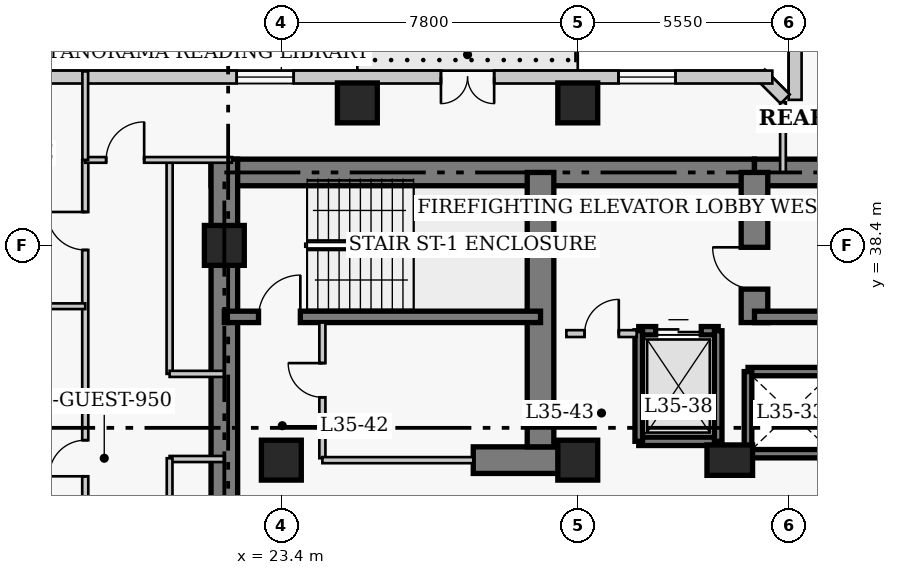
"""IFC4 building model, lengths in metres.
Left out: names, types, materials, properties, quantities, classifications, styles, units other than length and angle.
Written with IfcOpenShell. Run it as: python <this file> out.ifc"""

import sys

from ifc_helpers import new_model, si_unit, direction, frame, frame_2d, origin, origin_2d, place, context, subcontext, project, spatial, rectangle, extrude, element, fill, save


model = new_model("IFC4")
c1 = context("Model", 3, precision=1e-05, world=origin(), true_north=direction((0.0, 1.0)))
c2 = subcontext(c1, "Body", "Model", "MODEL_VIEW")
j1 = project(units=[si_unit("LENGTHUNIT", "METRE"), si_unit("PLANEANGLEUNIT", "RADIAN")], contexts=[c1])
p1 = place(None, origin())
s1 = spatial("IfcSite", under=j1, at=p1, CompositionType="ELEMENT")
p2 = place(p1, origin())
s2 = spatial("IfcBuilding", under=s1, at=p2, CompositionType="ELEMENT")
p3 = place(p2, frame((0.0, 0.0, 142.2)))
s3 = spatial("IfcBuildingStorey", under=s2, at=p3, CompositionType="ELEMENT", Elevation=142.2)
p4 = place(p3, frame((21.55, 40.32, 0.0), z_axis=(0.0, 0.0, 1.0), x_axis=(1.0, 0.0, 0.0)))
e1 = element("IfcWall", 1, at=p4, inside=s3, PredefinedType="SHEAR", context=c2, shape_type="SweptSolid", body=[
    extrude(rectangle(XDim=14.3, YDim=0.7, at=frame_2d((7.15, 0.0))), origin(), (0.0, 0.0, 1.0), 3.8),
])
p5 = place(p3, frame((35.85, 40.32, 0.0), z_axis=(0.0, 0.0, 1.0), x_axis=(1.0, 0.0, 0.0)))
e2 = element("IfcWall", 2, at=p5, inside=s3, PredefinedType="SHEAR", context=c2, shape_type="SweptSolid", body=[
    extrude(rectangle(XDim=12.6, YDim=0.7, at=frame_2d((6.3, 0.0))), origin(), (0.0, 0.0, 1.0), 3.8),
])
p6 = place(p3, frame((21.9, 27.05, 0.0), z_axis=(0.0, 0.0, 1.0), x_axis=(0.0, 1.0, 0.0)))
e3 = element("IfcWall", 3, at=p6, inside=s3, PredefinedType="SHEAR", context=c2, shape_type="SweptSolid", body=[
    extrude(rectangle(XDim=13.62, YDim=0.7, at=frame_2d((6.81, 0.0))), origin(), (0.0, 0.0, 1.0), 3.8),
])
p7 = place(p3, frame((28.45, 32.75, 0.0), z_axis=(0.0, 0.0, 1.0), x_axis=(1.0, 0.0, 0.0)))
e4 = element("IfcWall", 4, at=p7, inside=s3, PredefinedType="SHEAR", context=c2, shape_type="SweptSolid", body=[
    extrude(rectangle(XDim=2.4, YDim=0.7, at=frame_2d((1.2, 0.0))), origin(), (0.0, 0.0, 1.0), 3.8),
])
p8 = place(p3, frame((30.22, 33.1, 0.0), z_axis=(0.0, 0.0, 1.0), x_axis=(0.0, 1.0, 0.0)))
e5 = element("IfcWall", 5, at=p8, inside=s3, PredefinedType="SHEAR", context=c2, shape_type="SweptSolid", body=[
    extrude(rectangle(XDim=7.22, YDim=0.7, at=frame_2d((3.61, 0.0))), origin(), (0.0, 0.0, 1.0), 3.8),
])
p9 = place(p3, frame((35.85, 36.37, 0.0), z_axis=(0.0, 0.0, 1.0), x_axis=(0.0, 1.0, 0.0)))
e6 = element("IfcWall", 6, at=p9, inside=s3, PredefinedType="SHEAR", context=c2, shape_type="SweptSolid", body=[
    extrude(rectangle(XDim=3.95, YDim=0.7, at=frame_2d((1.975, 0.0))), origin(), (0.0, 0.0, 1.0), 3.8),
])
p10 = place(p9, frame((0.88, 0.0, 0.0)))
e7 = element("IfcOpeningElement", 7, at=p10, cuts=e6, PredefinedType="OPENING", context=c2, shape_type="SweptSolid", body=[
    extrude(rectangle(XDim=1.1, YDim=2.15, at=frame_2d((0.55, 1.075))), frame((0.0, 0.36, 0.0), z_axis=(0.0, -1.0, 0.0), x_axis=(1.0, 0.0, 0.0)), (0.0, 0.0, 1.0), 0.72),
])
p11 = place(p3, frame((21.9, 36.52, 0.0), z_axis=(0.0, 0.0, 1.0), x_axis=(1.0, 0.0, 0.0)))
e8 = element("IfcWall", 8, at=p11, inside=s3, PredefinedType="SHEAR", context=c2, shape_type="SweptSolid", body=[
    extrude(rectangle(XDim=8.32, YDim=0.3, at=frame_2d((4.16, 0.0))), origin(), (0.0, 0.0, 1.0), 3.8),
])
p12 = place(p11, frame((0.9, 0.0, 0.0)))
e9 = element("IfcOpeningElement", 9, at=p12, cuts=e8, PredefinedType="OPENING", context=c2, shape_type="SweptSolid", body=[
    extrude(rectangle(XDim=1.1, YDim=2.15, at=frame_2d((0.55, 1.075))), frame((0.0, 0.16, 0.0), z_axis=(0.0, -1.0, 0.0), x_axis=(1.0, 0.0, 0.0)), (0.0, 0.0, 1.0), 0.32),
])
p13 = place(p3, frame((35.85, 36.52, 0.0), z_axis=(0.0, 0.0, 1.0), x_axis=(1.0, 0.0, 0.0)))
e10 = element("IfcWall", 10, at=p13, inside=s3, PredefinedType="SHEAR", context=c2, shape_type="SweptSolid", body=[
    extrude(rectangle(XDim=8.33, YDim=0.3, at=frame_2d((4.165, 0.0))), origin(), (0.0, 0.0, 1.0), 3.8),
])
for number, where, z_axis, x_axis in (
    (11, (21.9, 38.4, 0.0), (0.0, 0.0, 1.0), (1.0, 0.0, 0.0)),
    (12, (23.4, 32.75, 0.0), (0.0, 0.0, 1.0), (1.0, 0.0, 0.0)),
    (13, (31.2, 32.75, 0.0), (0.0, 0.0, 1.0), (1.0, 0.0, 0.0)),
):
    element("IfcColumn", number, at=place(p3, frame(where, z_axis=z_axis, x_axis=x_axis)), inside=s3, PredefinedType="COLUMN", context=c2, shape_type="SweptSolid", body=[
        extrude(rectangle(XDim=1.05, YDim=1.05, at=origin_2d()), origin(), (0.0, 0.0, 1.0), 3.8),
    ])
p14 = place(p3, frame((35.2, 32.75, 0.0), z_axis=(0.0, 0.0, 1.0), x_axis=(1.0, 0.0, 0.0)))
e14 = element("IfcColumn", 14, at=p14, inside=s3, PredefinedType="COLUMN", context=c2, shape_type="SweptSolid", body=[
    extrude(rectangle(XDim=1.2, YDim=0.8, at=origin_2d()), origin(), (0.0, 0.0, 1.0), 3.8),
])
for number, where, z_axis, x_axis in (
    (15, (25.4, 42.15, 0.0), (0.0, 0.0, 1.0), (1.0, 0.0, 0.0)),
    (16, (31.2, 42.15, 0.0), (0.0, 0.0, 1.0), (1.0, 0.0, 0.0)),
):
    element("IfcColumn", number, at=place(p3, frame(where, z_axis=z_axis, x_axis=x_axis)), inside=s3, PredefinedType="COLUMN", context=c2, shape_type="SweptSolid", body=[
        extrude(rectangle(XDim=1.05, YDim=1.05, at=origin_2d()), origin(), (0.0, 0.0, 1.0), 3.8),
    ])
p15 = place(p3, frame((36.92, 44.37, 0.0), z_axis=(0.0, 0.0, 1.0), x_axis=(0.0, -1.0, 0.0)))
e17 = element("IfcWall", 17, at=p15, inside=s3, PredefinedType="SOLIDWALL", context=c2, shape_type="SweptSolid", body=[
    extrude(rectangle(XDim=2.14, YDim=0.34, at=frame_2d((1.07, 0.0))), origin(), (0.0, 0.0, 1.0), 3.55),
])
p16 = place(p3, frame((36.658, 42.251, 0.0), z_axis=(0.0, 0.0, 1.0), x_axis=(-0.707106781187, 0.707106781187, 0.0)))
e18 = element("IfcWall", 18, at=p16, inside=s3, PredefinedType="SOLIDWALL", context=c2, shape_type="SweptSolid", body=[
    extrude(rectangle(XDim=0.929, YDim=0.34, at=frame_2d((0.464, 0.0))), origin(), (0.0, 0.0, 1.0), 3.55),
])
p17 = place(p3, frame((36.32, 42.83, 0.0), z_axis=(0.0, 0.0, 1.0), x_axis=(-1.0, 0.0, 0.0)))
e19 = element("IfcWall", 19, at=p17, inside=s3, PredefinedType="SOLIDWALL", context=c2, shape_type="SweptSolid", body=[
    extrude(rectangle(XDim=26.69, YDim=0.34, at=frame_2d((13.345, 0.0))), origin(), (0.0, 0.0, 1.0), 3.55),
])
p18 = place(p17, frame((7.32, 0.0, 0.0)))
e20 = element("IfcOpeningElement", 20, at=p18, cuts=e19, PredefinedType="OPENING", context=c2, shape_type="SweptSolid", body=[
    extrude(rectangle(XDim=1.4, YDim=2.15, at=frame_2d((0.7, 1.075))), frame((0.0, 0.18, 0.0), z_axis=(0.0, -1.0, 0.0), x_axis=(1.0, 0.0, 0.0)), (0.0, 0.0, 1.0), 0.36),
])
p19 = place(p17, frame((2.548, 0.0, 0.85)))
e21 = element("IfcOpeningElement", 21, at=p19, cuts=e19, PredefinedType="OPENING", context=c2, shape_type="SweptSolid", body=[
    extrude(rectangle(XDim=1.5, YDim=1.75, at=frame_2d((0.75, 0.875))), frame((0.0, 0.18, 0.0), z_axis=(0.0, -1.0, 0.0), x_axis=(1.0, 0.0, 0.0)), (0.0, 0.0, 1.0), 0.36),
])
p20 = place(p17, frame((12.595, 0.0, 0.85)))
e22 = element("IfcOpeningElement", 22, at=p20, cuts=e19, PredefinedType="OPENING", context=c2, shape_type="SweptSolid", body=[
    extrude(rectangle(XDim=1.5, YDim=1.75, at=frame_2d((0.75, 0.875))), frame((0.0, 0.18, 0.0), z_axis=(0.0, -1.0, 0.0), x_axis=(1.0, 0.0, 0.0)), (0.0, 0.0, 1.0), 0.36),
])
p21 = place(p17, frame((21.492, 0.0, 0.85)))
e23 = element("IfcOpeningElement", 23, at=p21, cuts=e19, PredefinedType="OPENING", context=c2, shape_type="SweptSolid", body=[
    extrude(rectangle(XDim=1.5, YDim=1.75, at=frame_2d((0.75, 0.875))), frame((0.0, 0.18, 0.0), z_axis=(0.0, -1.0, 0.0), x_axis=(1.0, 0.0, 0.0)), (0.0, 0.0, 1.0), 0.36),
])
for number, where, z_axis, x_axis in (
    (24, (35.68, 35.08, 0.0), (0.0, 0.0, 1.0), (1.0, 0.0, 0.0)),
    (25, (35.68, 32.92, 0.0), (0.0, 0.0, 1.0), (1.0, 0.0, 0.0)),
):
    element("IfcWall", number, at=place(p3, frame(where, z_axis=z_axis, x_axis=x_axis)), inside=s3, PredefinedType="SHEAR", context=c2, shape_type="SweptSolid", body=[
        extrude(rectangle(XDim=2.32, YDim=0.22, at=frame_2d((1.16, 0.0))), origin(), (0.0, 0.0, 1.0), 3.8),
    ])
p22 = place(p3, frame((35.68, 32.92, 0.0), z_axis=(0.0, 0.0, 1.0), x_axis=(0.0, 1.0, 0.0)))
e26 = element("IfcWall", 26, at=p22, inside=s3, PredefinedType="SHEAR", context=c2, shape_type="SweptSolid", body=[
    extrude(rectangle(XDim=2.16, YDim=0.2, at=frame_2d((1.08, 0.0))), origin(), (0.0, 0.0, 1.0), 3.8),
])
p23 = place(p3, frame((32.805, 36.155, 0.0), z_axis=(0.0, 0.0, 1.0), x_axis=(1.0, 0.0, 0.0)))
e27 = element("IfcWall", 27, at=p23, inside=s3, PredefinedType="SHEAR", context=c2, shape_type="SweptSolid", body=[
    extrude(rectangle(XDim=2.09, YDim=0.22, at=frame_2d((1.045, 0.0))), origin(), (0.0, 0.0, 1.0), 3.8),
])
p24 = place(p23, frame((0.445, 0.0, 0.0)))
e28 = element("IfcOpeningElement", 28, at=p24, cuts=e27, PredefinedType="OPENING", context=c2, shape_type="SweptSolid", body=[
    extrude(rectangle(XDim=1.2, YDim=2.15, at=frame_2d((0.6, 1.075))), frame((0.0, 0.12, 0.0), z_axis=(0.0, -1.0, 0.0), x_axis=(1.0, 0.0, 0.0)), (0.0, 0.0, 1.0), 0.24),
])
p25 = place(p3, frame((32.805, 33.245, 0.0), z_axis=(0.0, 0.0, 1.0), x_axis=(1.0, 0.0, 0.0)))
e29 = element("IfcWall", 29, at=p25, inside=s3, PredefinedType="SHEAR", context=c2, shape_type="SweptSolid", body=[
    extrude(rectangle(XDim=2.09, YDim=0.22, at=frame_2d((1.045, 0.0))), origin(), (0.0, 0.0, 1.0), 3.8),
])
for number, where, z_axis, x_axis in (
    (30, (32.805, 33.245, 0.0), (0.0, 0.0, 1.0), (0.0, 1.0, 0.0)),
    (31, (34.895, 33.245, 0.0), (0.0, 0.0, 1.0), (0.0, 1.0, 0.0)),
):
    element("IfcWall", number, at=place(p3, frame(where, z_axis=z_axis, x_axis=x_axis)), inside=s3, PredefinedType="SHEAR", context=c2, shape_type="SweptSolid", body=[
        extrude(rectangle(XDim=2.91, YDim=0.2, at=frame_2d((1.455, 0.0))), origin(), (0.0, 0.0, 1.0), 3.8),
    ])
p26 = place(p3, frame((30.9, 36.08, 0.0), z_axis=(0.0, 0.0, 1.0), x_axis=(1.0, 0.0, 0.0)))
e32 = element("IfcWall", 32, at=p26, inside=s3, PredefinedType="PARTITIONING", context=c2, shape_type="SweptSolid", body=[
    extrude(rectangle(XDim=1.85, YDim=0.18, at=frame_2d((0.925, 0.0))), origin(), (0.0, 0.0, 1.0), 3.55),
])
p27 = place(p26, frame((0.48, 0.0, 0.0)))
e33 = element("IfcOpeningElement", 33, at=p27, cuts=e32, PredefinedType="OPENING", context=c2, shape_type="SweptSolid", body=[
    extrude(rectangle(XDim=0.9, YDim=2.15, at=frame_2d((0.45, 1.075))), frame((0.0, 0.1, 0.0), z_axis=(0.0, -1.0, 0.0), x_axis=(1.0, 0.0, 0.0)), (0.0, 0.0, 1.0), 0.2),
])
p28 = place(p3, frame((24.48, 32.8, 0.0), z_axis=(0.0, 0.0, 1.0), x_axis=(0.0, 1.0, 0.0)))
e34 = element("IfcWall", 34, at=p28, inside=s3, PredefinedType="PARTITIONING", context=c2, shape_type="SweptSolid", body=[
    extrude(rectangle(XDim=3.57, YDim=0.16, at=frame_2d((1.785, 0.0))), origin(), (0.0, 0.0, 1.0), 3.55),
])
p29 = place(p28, frame((1.604, 0.0, 0.0)))
e35 = element("IfcOpeningElement", 35, at=p29, cuts=e34, PredefinedType="OPENING", context=c2, shape_type="SweptSolid", body=[
    extrude(rectangle(XDim=0.9, YDim=2.1, at=frame_2d((0.45, 1.05))), frame((0.0, 0.09, 0.0), z_axis=(0.0, -1.0, 0.0), x_axis=(1.0, 0.0, 0.0)), (0.0, 0.0, 1.0), 0.18),
])
p30 = place(p3, frame((24.48, 32.75, 0.0), z_axis=(0.0, 0.0, 1.0), x_axis=(1.0, 0.0, 0.0)))
e36 = element("IfcWall", 36, at=p30, inside=s3, PredefinedType="PARTITIONING", context=c2, shape_type="SweptSolid", body=[
    extrude(rectangle(XDim=3.97, YDim=0.16, at=frame_2d((1.985, 0.0))), origin(), (0.0, 0.0, 1.0), 3.55),
])
p31 = place(p3, frame((18.24, 6.85, 0.0), z_axis=(0.0, 0.0, 1.0), x_axis=(0.0, 1.0, 0.0)))
e37 = element("IfcWall", 37, at=p31, inside=s3, PredefinedType="PARTITIONING", context=c2, shape_type="SweptSolid", body=[
    extrude(rectangle(XDim=33.8, YDim=0.16, at=frame_2d((16.9, 0.0))), origin(), (0.0, 0.0, 1.0), 3.55),
])
p32 = place(p31, frame((1.7, 0.0, 0.0)))
e38 = element("IfcOpeningElement", 38, at=p32, cuts=e37, PredefinedType="OPENING", context=c2, shape_type="SweptSolid", body=[
    extrude(rectangle(XDim=0.95, YDim=2.1, at=frame_2d((0.475, 1.05))), frame((0.0, 0.09, 0.0), z_axis=(0.0, -1.0, 0.0), x_axis=(1.0, 0.0, 0.0)), (0.0, 0.0, 1.0), 0.18),
])
p33 = place(p31, frame((12.675, 0.0, 0.0)))
e39 = element("IfcOpeningElement", 39, at=p33, cuts=e37, PredefinedType="OPENING", context=c2, shape_type="SweptSolid", body=[
    extrude(rectangle(XDim=0.95, YDim=2.1, at=frame_2d((0.475, 1.05))), frame((0.0, 0.09, 0.0), z_axis=(0.0, -1.0, 0.0), x_axis=(1.0, 0.0, 0.0)), (0.0, 0.0, 1.0), 0.18),
])
p34 = place(p31, frame((25.475, 0.0, 0.0)))
e40 = element("IfcOpeningElement", 40, at=p34, cuts=e37, PredefinedType="OPENING", context=c2, shape_type="SweptSolid", body=[
    extrude(rectangle(XDim=0.95, YDim=2.1, at=frame_2d((0.475, 1.05))), frame((0.0, 0.09, 0.0), z_axis=(0.0, -1.0, 0.0), x_axis=(1.0, 0.0, 0.0)), (0.0, 0.0, 1.0), 0.18),
])
p35 = place(p31, frame((31.43, 0.0, 0.0)))
e41 = element("IfcOpeningElement", 41, at=p35, cuts=e37, PredefinedType="OPENING", context=c2, shape_type="SweptSolid", body=[
    extrude(rectangle(XDim=1.0, YDim=2.15, at=frame_2d((0.5, 1.075))), frame((0.0, 0.09, 0.0), z_axis=(0.0, -1.0, 0.0), x_axis=(1.0, 0.0, 0.0)), (0.0, 0.0, 1.0), 0.18),
])
p36 = place(p3, frame((20.46, 35.02, 0.0), z_axis=(0.0, 0.0, 1.0), x_axis=(0.0, 1.0, 0.0)))
e42 = element("IfcWall", 42, at=p36, inside=s3, PredefinedType="PARTITIONING", context=c2, shape_type="SweptSolid", body=[
    extrude(rectangle(XDim=5.63, YDim=0.16, at=frame_2d((2.815, 0.0))), origin(), (0.0, 0.0, 1.0), 3.55),
])
for number, where, z_axis, x_axis in (
    (43, (20.46, 35.02, 0.0), (0.0, 0.0, 1.0), (1.0, 0.0, 0.0)),
    (44, (20.46, 32.78, 0.0), (0.0, 0.0, 1.0), (1.0, 0.0, 0.0)),
):
    element("IfcWall", number, at=place(p3, frame(where, z_axis=z_axis, x_axis=x_axis)), inside=s3, PredefinedType="PARTITIONING", context=c2, shape_type="SweptSolid", body=[
        extrude(rectangle(XDim=1.44, YDim=0.16, at=frame_2d((0.72, 0.0))), origin(), (0.0, 0.0, 1.0), 3.55),
    ])
p37 = place(p3, frame((18.24, 40.65, 0.0), z_axis=(0.0, 0.0, 1.0), x_axis=(1.0, 0.0, 0.0)))
e45 = element("IfcWall", 45, at=p37, inside=s3, PredefinedType="PARTITIONING", context=c2, shape_type="SweptSolid", body=[
    extrude(rectangle(XDim=3.86, YDim=0.15, at=frame_2d((1.93, 0.0))), origin(), (0.0, 0.0, 1.0), 3.55),
])
p38 = place(p37, frame((0.55, 0.0, 0.0)))
e46 = element("IfcOpeningElement", 46, at=p38, cuts=e45, PredefinedType="OPENING", context=c2, shape_type="SweptSolid", body=[
    extrude(rectangle(XDim=1.0, YDim=2.15, at=frame_2d((0.5, 1.075))), frame((0.0, 0.085, 0.0), z_axis=(0.0, -1.0, 0.0), x_axis=(1.0, 0.0, 0.0)), (0.0, 0.0, 1.0), 0.17),
])
p39 = place(p3, frame((20.46, 16.66, 0.0), z_axis=(0.0, 0.0, 1.0), x_axis=(0.0, 1.0, 0.0)))
e47 = element("IfcWall", 47, at=p39, inside=s3, PredefinedType="PARTITIONING", context=c2, shape_type="SweptSolid", body=[
    extrude(rectangle(XDim=16.14, YDim=0.15, at=frame_2d((8.07, 0.0))), origin(), (0.0, 0.0, 1.0), 3.55),
])
p40 = place(p3, frame((18.24, 40.65, 0.0), z_axis=(0.0, 0.0, 1.0), x_axis=(0.0, 1.0, 0.0)))
e48 = element("IfcWall", 48, at=p40, inside=s3, PredefinedType="PARTITIONING", context=c2, shape_type="SweptSolid", body=[
    extrude(rectangle(XDim=2.33, YDim=0.15, at=frame_2d((1.165, 0.0))), origin(), (0.0, 0.0, 1.0), 3.55),
])
p41 = place(p3, frame((36.6, 40.32, 0.0), z_axis=(0.0, 0.0, 1.0), x_axis=(0.0, 1.0, 0.0)))
e49 = element("IfcWall", 49, at=p41, inside=s3, PredefinedType="PARTITIONING", context=c2, shape_type="SweptSolid", body=[
    extrude(rectangle(XDim=1.845, YDim=0.15, at=frame_2d((0.922, 0.0))), origin(), (0.0, 0.0, 1.0), 3.55),
])
p42 = place(p3, frame((14.45, 36.8, 0.0), z_axis=(0.0, 0.0, 1.0), x_axis=(1.0, 0.0, 0.0)))
e50 = element("IfcWall", 50, at=p42, inside=s3, PredefinedType="PARTITIONING", context=c2, shape_type="SweptSolid", body=[
    extrude(rectangle(XDim=3.79, YDim=0.15, at=frame_2d((1.895, 0.0))), origin(), (0.0, 0.0, 1.0), 3.55),
])
p43 = place(p18, origin())
e51 = element("IfcDoor", 51, at=p43, inside=s3, OperationType="DOUBLE_DOOR_SINGLE_SWING", PredefinedType="DOOR", context=c2, shape_type="SweptSolid", body=[
    extrude(rectangle(XDim=1.4, YDim=2.15, at=frame_2d((0.7, 1.075))), frame((0.0, 0.025, 0.0), z_axis=(0.0, -1.0, 0.0), x_axis=(1.0, 0.0, 0.0)), (0.0, 0.0, 1.0), 0.05),
])
fill(e20, e51)
p44 = place(p19, origin())
e52 = element("IfcWindow", 52, at=p44, inside=s3, PartitioningType="SINGLE_PANEL", PredefinedType="WINDOW", context=c2, shape_type="SweptSolid", body=[
    extrude(rectangle(XDim=1.5, YDim=1.75, at=frame_2d((0.75, 0.875))), frame((0.0, 0.03, 0.0), z_axis=(0.0, -1.0, 0.0), x_axis=(1.0, 0.0, 0.0)), (0.0, 0.0, 1.0), 0.06),
])
fill(e21, e52)
p45 = place(p20, origin())
e53 = element("IfcWindow", 53, at=p45, inside=s3, PartitioningType="SINGLE_PANEL", PredefinedType="WINDOW", context=c2, shape_type="SweptSolid", body=[
    extrude(rectangle(XDim=1.5, YDim=1.75, at=frame_2d((0.75, 0.875))), frame((0.0, 0.03, 0.0), z_axis=(0.0, -1.0, 0.0), x_axis=(1.0, 0.0, 0.0)), (0.0, 0.0, 1.0), 0.06),
])
fill(e22, e53)
p46 = place(p24, origin())
e54 = element("IfcDoor", 54, at=p46, inside=s3, OperationType="DOUBLE_DOOR_SLIDING", PredefinedType="DOOR", context=c2, shape_type="SweptSolid", body=[
    extrude(rectangle(XDim=1.2, YDim=2.15, at=frame_2d((0.6, 1.075))), frame((0.0, 0.025, 0.0), z_axis=(0.0, -1.0, 0.0), x_axis=(1.0, 0.0, 0.0)), (0.0, 0.0, 1.0), 0.05),
])
fill(e28, e54)
p47 = place(p27, origin())
e55 = element("IfcDoor", 55, at=p47, inside=s3, OperationType="SINGLE_SWING_RIGHT", PredefinedType="DOOR", context=c2, shape_type="SweptSolid", body=[
    extrude(rectangle(XDim=0.9, YDim=2.15, at=frame_2d((0.45, 1.075))), frame((0.0, 0.025, 0.0), z_axis=(0.0, -1.0, 0.0), x_axis=(1.0, 0.0, 0.0)), (0.0, 0.0, 1.0), 0.05),
])
fill(e33, e55)
p48 = place(p29, origin())
e56 = element("IfcDoor", 56, at=p48, inside=s3, OperationType="SINGLE_SWING_RIGHT", PredefinedType="DOOR", context=c2, shape_type="SweptSolid", body=[
    extrude(rectangle(XDim=0.9, YDim=2.1, at=frame_2d((0.45, 1.05))), frame((0.0, 0.025, 0.0), z_axis=(0.0, -1.0, 0.0), x_axis=(1.0, 0.0, 0.0)), (0.0, 0.0, 1.0), 0.05),
])
fill(e35, e56)
p49 = place(p38, origin())
e57 = element("IfcDoor", 57, at=p49, inside=s3, OperationType="SINGLE_SWING_RIGHT", PredefinedType="DOOR", context=c2, shape_type="SweptSolid", body=[
    extrude(rectangle(XDim=1.0, YDim=2.15, at=frame_2d((0.5, 1.075))), frame((0.0, 0.025, 0.0), z_axis=(0.0, -1.0, 0.0), x_axis=(1.0, 0.0, 0.0)), (0.0, 0.0, 1.0), 0.05),
])
fill(e46, e57)
p50 = place(p34, origin())
e58 = element("IfcDoor", 58, at=p50, inside=s3, OperationType="SINGLE_SWING_LEFT", PredefinedType="DOOR", context=c2, shape_type="SweptSolid", body=[
    extrude(rectangle(XDim=0.95, YDim=2.1, at=frame_2d((0.475, 1.05))), frame((0.0, 0.025, 0.0), z_axis=(0.0, -1.0, 0.0), x_axis=(1.0, 0.0, 0.0)), (0.0, 0.0, 1.0), 0.05),
])
fill(e40, e58)
p51 = place(p35, origin())
e59 = element("IfcDoor", 59, at=p51, inside=s3, OperationType="SINGLE_SWING_RIGHT", PredefinedType="DOOR", context=c2, shape_type="SweptSolid", body=[
    extrude(rectangle(XDim=1.0, YDim=2.15, at=frame_2d((0.5, 1.075))), frame((0.0, 0.025, 0.0), z_axis=(0.0, -1.0, 0.0), x_axis=(1.0, 0.0, 0.0)), (0.0, 0.0, 1.0), 0.05),
])
fill(e41, e59)
p52 = place(p12, origin())
e60 = element("IfcDoor", 60, at=p52, inside=s3, OperationType="SINGLE_SWING_RIGHT", PredefinedType="DOOR", context=c2, shape_type="SweptSolid", body=[
    extrude(rectangle(XDim=1.1, YDim=2.15, at=frame_2d((0.55, 1.075))), frame((0.0, 0.025, 0.0), z_axis=(0.0, -1.0, 0.0), x_axis=(1.0, 0.0, 0.0)), (0.0, 0.0, 1.0), 0.05),
])
fill(e9, e60)
p53 = place(p10, origin())
e61 = element("IfcDoor", 61, at=p53, inside=s3, OperationType="SINGLE_SWING_RIGHT", PredefinedType="DOOR", context=c2, shape_type="SweptSolid", body=[
    extrude(rectangle(XDim=1.1, YDim=2.15, at=frame_2d((0.55, 1.075))), frame((0.0, 0.025, 0.0), z_axis=(0.0, -1.0, 0.0), x_axis=(1.0, 0.0, 0.0)), (0.0, 0.0, 1.0), 0.05),
])
fill(e7, e61)
save(model, sys.argv[1])
